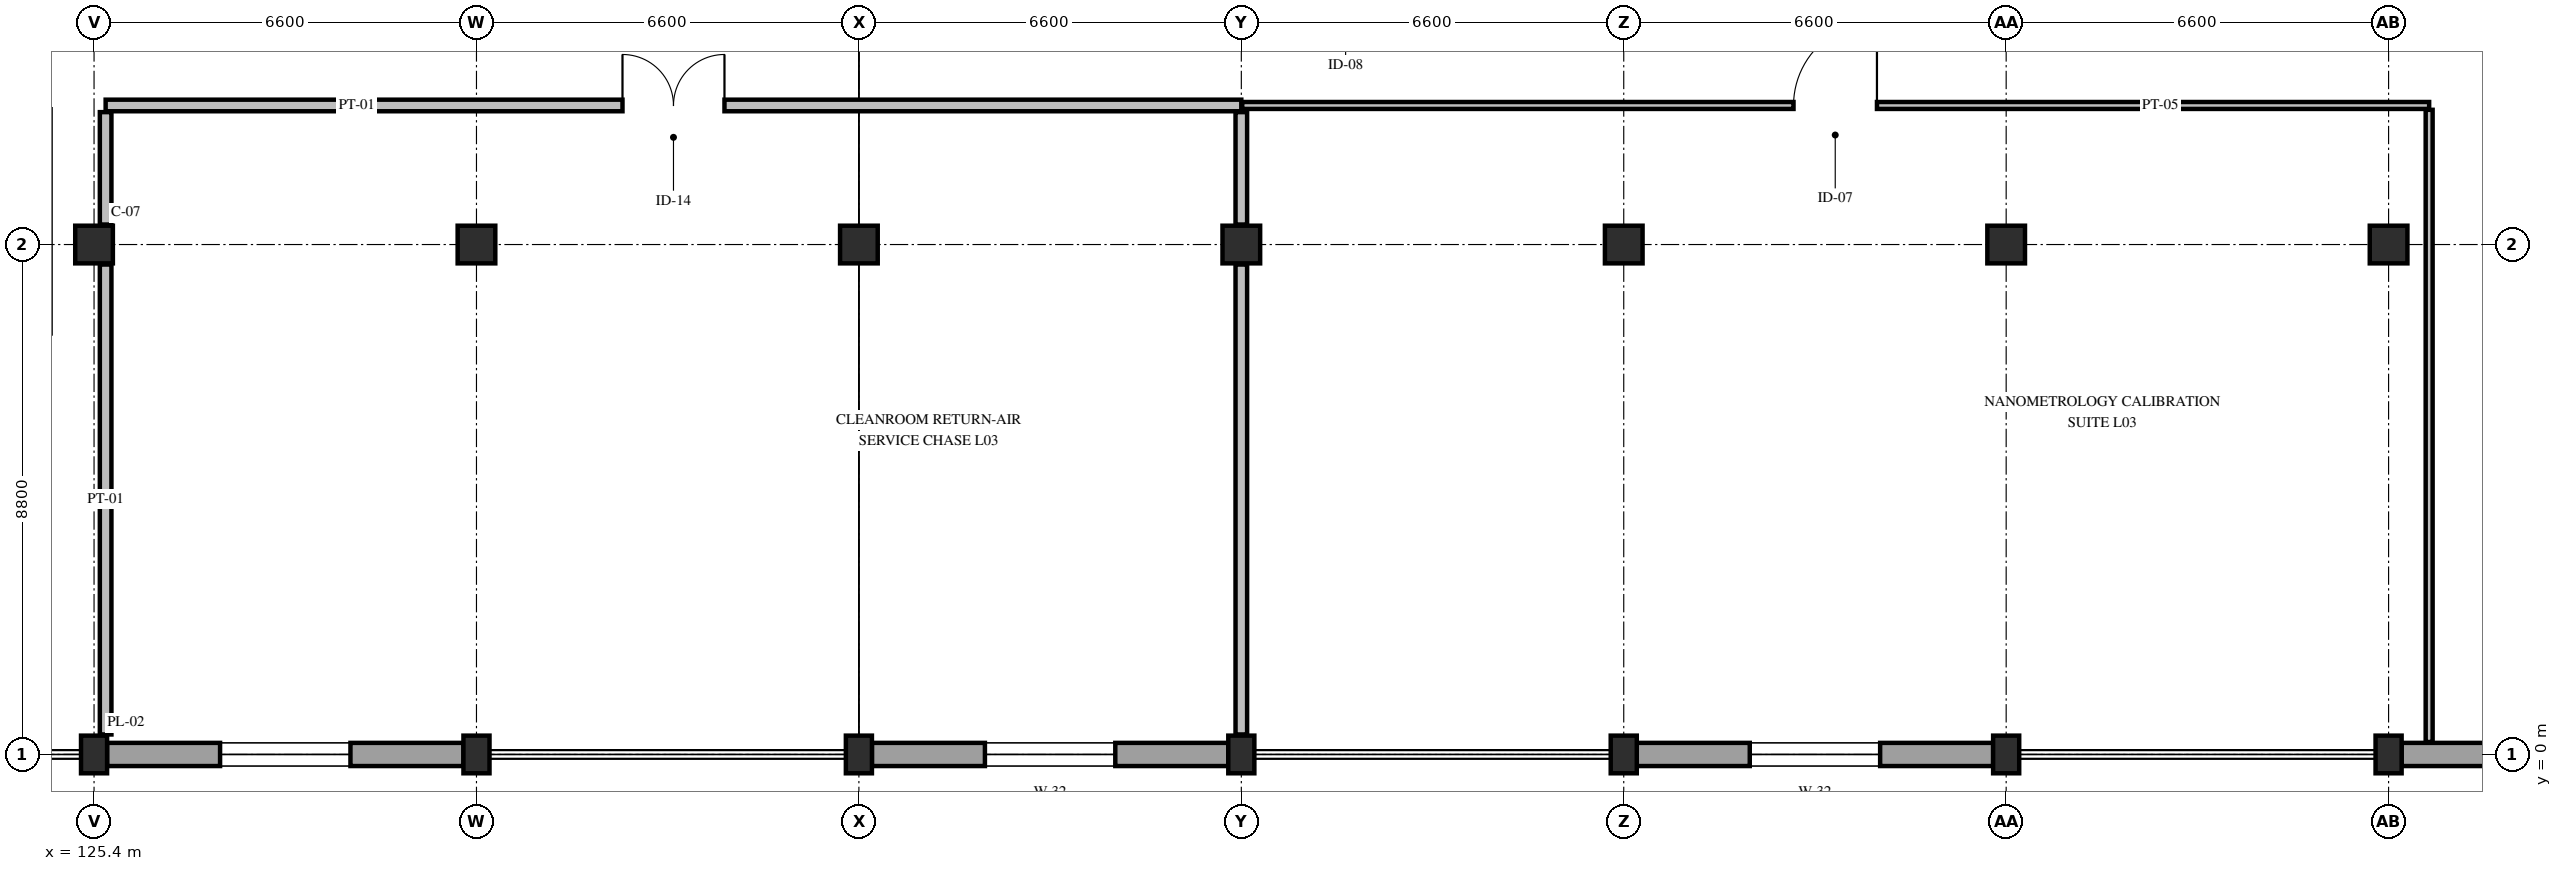
"""IFC4 building model, lengths in metres.
Left out: names, types, materials, properties, quantities, classifications, styles, units other than length and angle.
Written with IfcOpenShell. Run it as: python <this file> out.ifc"""

import sys

from ifc_helpers import new_model, si_unit, direction, frame, frame_2d, origin, origin_2d, place, context, subcontext, project, spatial, rectangle, extrude, element, fill, save


model = new_model("IFC4")
c1 = context("Model", 3, precision=1e-05, world=origin(), true_north=direction((0.0, 1.0)))
c2 = subcontext(c1, "Body", "Model", "MODEL_VIEW")
j1 = project(units=[si_unit("LENGTHUNIT", "METRE"), si_unit("PLANEANGLEUNIT", "RADIAN")], contexts=[c1])
p1 = place(None, origin())
s1 = spatial("IfcSite", under=j1, at=p1, CompositionType="ELEMENT")
p2 = place(p1, origin())
s2 = spatial("IfcBuilding", under=s1, at=p2, CompositionType="ELEMENT")
p3 = place(p2, frame((0.0, 0.0, 15.0)))
s3 = spatial("IfcBuildingStorey", under=s2, at=p3, CompositionType="ELEMENT", Elevation=15.0)
p4 = place(p3, frame((125.4, 0.0, 0.0), z_axis=(0.0, 0.0, 1.0), x_axis=(1.0, 0.0, 0.0)))
e1 = element("IfcColumn", 1, at=p4, inside=s3, PredefinedType="PILASTER", context=c2, shape_type="SweptSolid", body=[
    extrude(rectangle(XDim=0.45, YDim=0.65, at=origin_2d()), origin(), (0.0, 0.0, 1.0), 4.8),
])
p5 = place(p3, frame((125.4, 8.8, 0.0), z_axis=(0.0, 0.0, 1.0), x_axis=(1.0, 0.0, 0.0)))
e2 = element("IfcColumn", 2, at=p5, inside=s3, PredefinedType="COLUMN", context=c2, shape_type="SweptSolid", body=[
    extrude(rectangle(XDim=0.65, YDim=0.65, at=origin_2d()), origin(), (0.0, 0.0, 1.0), 4.8),
])
p6 = place(p3, frame((132.0, 0.0, 0.0), z_axis=(0.0, 0.0, 1.0), x_axis=(1.0, 0.0, 0.0)))
e3 = element("IfcColumn", 3, at=p6, inside=s3, PredefinedType="PILASTER", context=c2, shape_type="SweptSolid", body=[
    extrude(rectangle(XDim=0.45, YDim=0.65, at=origin_2d()), origin(), (0.0, 0.0, 1.0), 4.8),
])
p7 = place(p3, frame((132.0, 8.8, 0.0), z_axis=(0.0, 0.0, 1.0), x_axis=(1.0, 0.0, 0.0)))
e4 = element("IfcColumn", 4, at=p7, inside=s3, PredefinedType="COLUMN", context=c2, shape_type="SweptSolid", body=[
    extrude(rectangle(XDim=0.65, YDim=0.65, at=origin_2d()), origin(), (0.0, 0.0, 1.0), 4.8),
])
p8 = place(p3, frame((138.6, 0.0, 0.0), z_axis=(0.0, 0.0, 1.0), x_axis=(1.0, 0.0, 0.0)))
e5 = element("IfcColumn", 5, at=p8, inside=s3, PredefinedType="PILASTER", context=c2, shape_type="SweptSolid", body=[
    extrude(rectangle(XDim=0.45, YDim=0.65, at=origin_2d()), origin(), (0.0, 0.0, 1.0), 4.8),
])
p9 = place(p3, frame((138.6, 8.8, 0.0), z_axis=(0.0, 0.0, 1.0), x_axis=(1.0, 0.0, 0.0)))
e6 = element("IfcColumn", 6, at=p9, inside=s3, PredefinedType="COLUMN", context=c2, shape_type="SweptSolid", body=[
    extrude(rectangle(XDim=0.65, YDim=0.65, at=origin_2d()), origin(), (0.0, 0.0, 1.0), 4.8),
])
p10 = place(p3, frame((145.2, 0.0, 0.0), z_axis=(0.0, 0.0, 1.0), x_axis=(1.0, 0.0, 0.0)))
e7 = element("IfcColumn", 7, at=p10, inside=s3, PredefinedType="PILASTER", context=c2, shape_type="SweptSolid", body=[
    extrude(rectangle(XDim=0.45, YDim=0.65, at=origin_2d()), origin(), (0.0, 0.0, 1.0), 4.8),
])
p11 = place(p3, frame((145.2, 8.8, 0.0), z_axis=(0.0, 0.0, 1.0), x_axis=(1.0, 0.0, 0.0)))
e8 = element("IfcColumn", 8, at=p11, inside=s3, PredefinedType="COLUMN", context=c2, shape_type="SweptSolid", body=[
    extrude(rectangle(XDim=0.65, YDim=0.65, at=origin_2d()), origin(), (0.0, 0.0, 1.0), 4.8),
])
p12 = place(p3, frame((151.8, 0.0, 0.0), z_axis=(0.0, 0.0, 1.0), x_axis=(1.0, 0.0, 0.0)))
e9 = element("IfcColumn", 9, at=p12, inside=s3, PredefinedType="PILASTER", context=c2, shape_type="SweptSolid", body=[
    extrude(rectangle(XDim=0.45, YDim=0.65, at=origin_2d()), origin(), (0.0, 0.0, 1.0), 4.8),
])
p13 = place(p3, frame((151.8, 8.8, 0.0), z_axis=(0.0, 0.0, 1.0), x_axis=(1.0, 0.0, 0.0)))
e10 = element("IfcColumn", 10, at=p13, inside=s3, PredefinedType="COLUMN", context=c2, shape_type="SweptSolid", body=[
    extrude(rectangle(XDim=0.65, YDim=0.65, at=origin_2d()), origin(), (0.0, 0.0, 1.0), 4.8),
])
p14 = place(p3, frame((158.4, 0.0, 0.0), z_axis=(0.0, 0.0, 1.0), x_axis=(1.0, 0.0, 0.0)))
e11 = element("IfcColumn", 11, at=p14, inside=s3, PredefinedType="PILASTER", context=c2, shape_type="SweptSolid", body=[
    extrude(rectangle(XDim=0.45, YDim=0.65, at=origin_2d()), origin(), (0.0, 0.0, 1.0), 4.8),
])
p15 = place(p3, frame((158.4, 8.8, 0.0), z_axis=(0.0, 0.0, 1.0), x_axis=(1.0, 0.0, 0.0)))
e12 = element("IfcColumn", 12, at=p15, inside=s3, PredefinedType="COLUMN", context=c2, shape_type="SweptSolid", body=[
    extrude(rectangle(XDim=0.65, YDim=0.65, at=origin_2d()), origin(), (0.0, 0.0, 1.0), 4.8),
])
p16 = place(p3, frame((165.0, 0.0, 0.0), z_axis=(0.0, 0.0, 1.0), x_axis=(1.0, 0.0, 0.0)))
e13 = element("IfcColumn", 13, at=p16, inside=s3, PredefinedType="PILASTER", context=c2, shape_type="SweptSolid", body=[
    extrude(rectangle(XDim=0.45, YDim=0.65, at=origin_2d()), origin(), (0.0, 0.0, 1.0), 4.8),
])
p17 = place(p3, frame((165.0, 8.8, 0.0), z_axis=(0.0, 0.0, 1.0), x_axis=(1.0, 0.0, 0.0)))
e14 = element("IfcColumn", 14, at=p17, inside=s3, PredefinedType="COLUMN", context=c2, shape_type="SweptSolid", body=[
    extrude(rectangle(XDim=0.65, YDim=0.65, at=origin_2d()), origin(), (0.0, 0.0, 1.0), 4.8),
])
p18 = place(p3, frame((171.375, 0.0, 0.0), z_axis=(0.0, 0.0, 1.0), x_axis=(-1.0, 0.0, 0.0)))
e15 = element("IfcWall", 15, at=p18, inside=s3, PredefinedType="STANDARD", context=c2, shape_type="SweptSolid", body=[
    extrude(rectangle(XDim=6.15, YDim=0.4, at=frame_2d((3.075, 0.0))), origin(), (0.0, 0.0, 1.0), 3.98),
])
p19 = place(p18, frame((1.95, 0.0, 0.85)))
e16 = element("IfcOpeningElement", 16, at=p19, cuts=e15, PredefinedType="OPENING", context=c2, shape_type="SweptSolid", body=[
    extrude(rectangle(XDim=2.25, YDim=1.88, at=frame_2d((1.125, 0.94))), frame((0.0, 0.215, 0.0), z_axis=(0.0, -1.0, 0.0), x_axis=(1.0, 0.0, 0.0)), (0.0, 0.0, 1.0), 0.43),
])
p20 = place(p3, frame((158.175, 0.0, 0.0), z_axis=(0.0, 0.0, 1.0), x_axis=(-1.0, 0.0, 0.0)))
e17 = element("IfcWall", 17, at=p20, inside=s3, PredefinedType="STANDARD", context=c2, shape_type="SweptSolid", body=[
    extrude(rectangle(XDim=6.15, YDim=0.4, at=frame_2d((3.075, 0.0))), origin(), (0.0, 0.0, 1.0), 3.98),
])
p21 = place(p20, frame((1.95, 0.0, 0.85)))
e18 = element("IfcOpeningElement", 18, at=p21, cuts=e17, PredefinedType="OPENING", context=c2, shape_type="SweptSolid", body=[
    extrude(rectangle(XDim=2.25, YDim=1.88, at=frame_2d((1.125, 0.94))), frame((0.0, 0.215, 0.0), z_axis=(0.0, -1.0, 0.0), x_axis=(1.0, 0.0, 0.0)), (0.0, 0.0, 1.0), 0.43),
])
p22 = place(p3, frame((144.975, 0.0, 0.0), z_axis=(0.0, 0.0, 1.0), x_axis=(-1.0, 0.0, 0.0)))
e19 = element("IfcWall", 19, at=p22, inside=s3, PredefinedType="STANDARD", context=c2, shape_type="SweptSolid", body=[
    extrude(rectangle(XDim=6.15, YDim=0.4, at=frame_2d((3.075, 0.0))), origin(), (0.0, 0.0, 1.0), 3.98),
])
p23 = place(p22, frame((1.95, 0.0, 0.85)))
e20 = element("IfcOpeningElement", 20, at=p23, cuts=e19, PredefinedType="OPENING", context=c2, shape_type="SweptSolid", body=[
    extrude(rectangle(XDim=2.25, YDim=1.88, at=frame_2d((1.125, 0.94))), frame((0.0, 0.215, 0.0), z_axis=(0.0, -1.0, 0.0), x_axis=(1.0, 0.0, 0.0)), (0.0, 0.0, 1.0), 0.43),
])
p24 = place(p3, frame((131.775, 0.0, 0.0), z_axis=(0.0, 0.0, 1.0), x_axis=(-1.0, 0.0, 0.0)))
e21 = element("IfcWall", 21, at=p24, inside=s3, PredefinedType="STANDARD", context=c2, shape_type="SweptSolid", body=[
    extrude(rectangle(XDim=6.15, YDim=0.4, at=frame_2d((3.075, 0.0))), origin(), (0.0, 0.0, 1.0), 3.98),
])
p25 = place(p24, frame((1.95, 0.0, 0.85)))
e22 = element("IfcOpeningElement", 22, at=p25, cuts=e21, PredefinedType="OPENING", context=c2, shape_type="SweptSolid", body=[
    extrude(rectangle(XDim=2.25, YDim=1.88, at=frame_2d((1.125, 0.94))), frame((0.0, 0.215, 0.0), z_axis=(0.0, -1.0, 0.0), x_axis=(1.0, 0.0, 0.0)), (0.0, 0.0, 1.0), 0.43),
])
p26 = place(p3, frame((125.6, 11.2, 0.0), z_axis=(0.0, 0.0, 1.0), x_axis=(1.0, 0.0, 0.0)))
e23 = element("IfcWall", 23, at=p26, inside=s3, PredefinedType="PARTITIONING", context=c2, shape_type="SweptSolid", body=[
    extrude(rectangle(XDim=19.6, YDim=0.2, at=frame_2d((9.8, 0.0))), origin(), (0.0, 0.0, 1.0), 4.065),
])
p27 = place(p26, frame((8.92, 0.0, 0.0)))
e24 = element("IfcOpeningElement", 24, at=p27, cuts=e23, PredefinedType="OPENING", context=c2, shape_type="SweptSolid", body=[
    extrude(rectangle(XDim=1.76, YDim=2.35, at=frame_2d((0.88, 1.175))), frame((0.0, 0.115, 0.0), z_axis=(0.0, -1.0, 0.0), x_axis=(1.0, 0.0, 0.0)), (0.0, 0.0, 1.0), 0.23),
])
p28 = place(p3, frame((125.6, 0.345, 0.0), z_axis=(0.0, 0.0, 1.0), x_axis=(0.0, 1.0, 0.0)))
e25 = element("IfcWall", 25, at=p28, inside=s3, PredefinedType="PARTITIONING", context=c2, shape_type="SweptSolid", body=[
    extrude(rectangle(XDim=8.11, YDim=0.2, at=frame_2d((4.055, 0.0))), origin(), (0.0, 0.0, 1.0), 4.065),
])
p29 = place(p3, frame((125.6, 9.145, 0.0), z_axis=(0.0, 0.0, 1.0), x_axis=(0.0, 1.0, 0.0)))
e26 = element("IfcWall", 26, at=p29, inside=s3, PredefinedType="PARTITIONING", context=c2, shape_type="SweptSolid", body=[
    extrude(rectangle(XDim=1.94, YDim=0.2, at=frame_2d((0.97, 0.0))), origin(), (0.0, 0.0, 1.0), 4.065),
])
p30 = place(p3, frame((145.2, 0.345, 0.0), z_axis=(0.0, 0.0, 1.0), x_axis=(0.0, 1.0, 0.0)))
e27 = element("IfcWall", 27, at=p30, inside=s3, PredefinedType="PARTITIONING", context=c2, shape_type="SweptSolid", body=[
    extrude(rectangle(XDim=8.11, YDim=0.2, at=frame_2d((4.055, 0.0))), origin(), (0.0, 0.0, 1.0), 4.065),
])
p31 = place(p3, frame((145.2, 9.145, 0.0), z_axis=(0.0, 0.0, 1.0), x_axis=(0.0, 1.0, 0.0)))
e28 = element("IfcWall", 28, at=p31, inside=s3, PredefinedType="PARTITIONING", context=c2, shape_type="SweptSolid", body=[
    extrude(rectangle(XDim=1.94, YDim=0.2, at=frame_2d((0.97, 0.0))), origin(), (0.0, 0.0, 1.0), 4.065),
])
p32 = place(p3, frame((145.215, 11.2, 0.0), z_axis=(0.0, 0.0, 1.0), x_axis=(1.0, 0.0, 0.0)))
e29 = element("IfcWall", 29, at=p32, inside=s3, PredefinedType="PARTITIONING", context=c2, shape_type="SweptSolid", body=[
    extrude(rectangle(XDim=20.485, YDim=0.12, at=frame_2d((10.242, 0.0))), origin(), (0.0, 0.0, 1.0), 4.065),
])
p33 = place(p32, frame((9.515, 0.0, 0.0)))
e30 = element("IfcOpeningElement", 30, at=p33, cuts=e29, PredefinedType="OPENING", context=c2, shape_type="SweptSolid", body=[
    extrude(rectangle(XDim=1.44, YDim=2.25, at=frame_2d((0.72, 1.125))), frame((0.0, 0.075, 0.0), z_axis=(0.0, -1.0, 0.0), x_axis=(1.0, 0.0, 0.0)), (0.0, 0.0, 1.0), 0.15),
])
p34 = place(p3, frame((165.7, 0.215, 0.0), z_axis=(0.0, 0.0, 1.0), x_axis=(0.0, 1.0, 0.0)))
e31 = element("IfcWall", 31, at=p34, inside=s3, PredefinedType="PARTITIONING", context=c2, shape_type="SweptSolid", body=[
    extrude(rectangle(XDim=10.91, YDim=0.12, at=frame_2d((5.455, 0.0))), origin(), (0.0, 0.0, 1.0), 3.98),
])
p35 = place(p21, origin())
e32 = element("IfcWindow", 32, at=p35, inside=s3, PartitioningType="DOUBLE_PANEL_VERTICAL", PredefinedType="WINDOW", context=c2, shape_type="SweptSolid", body=[
    extrude(rectangle(XDim=2.25, YDim=1.88, at=frame_2d((1.125, 0.94))), frame((0.0, 0.03, 0.0), z_axis=(0.0, -1.0, 0.0), x_axis=(1.0, 0.0, 0.0)), (0.0, 0.0, 1.0), 0.06),
])
fill(e18, e32)
p36 = place(p23, origin())
e33 = element("IfcWindow", 33, at=p36, inside=s3, PartitioningType="DOUBLE_PANEL_VERTICAL", PredefinedType="WINDOW", context=c2, shape_type="SweptSolid", body=[
    extrude(rectangle(XDim=2.25, YDim=1.88, at=frame_2d((1.125, 0.94))), frame((0.0, 0.03, 0.0), z_axis=(0.0, -1.0, 0.0), x_axis=(1.0, 0.0, 0.0)), (0.0, 0.0, 1.0), 0.06),
])
fill(e20, e33)
p37 = place(p25, origin())
e34 = element("IfcWindow", 34, at=p37, inside=s3, PartitioningType="DOUBLE_PANEL_VERTICAL", PredefinedType="WINDOW", context=c2, shape_type="SweptSolid", body=[
    extrude(rectangle(XDim=2.25, YDim=1.88, at=frame_2d((1.125, 0.94))), frame((0.0, 0.03, 0.0), z_axis=(0.0, -1.0, 0.0), x_axis=(1.0, 0.0, 0.0)), (0.0, 0.0, 1.0), 0.06),
])
fill(e22, e34)
p38 = place(p27, origin())
e35 = element("IfcDoor", 35, at=p38, inside=s3, OperationType="DOUBLE_DOOR_SINGLE_SWING", PredefinedType="DOOR", context=c2, shape_type="SweptSolid", body=[
    extrude(rectangle(XDim=1.76, YDim=2.35, at=frame_2d((0.88, 1.175))), frame((0.0, 0.025, 0.0), z_axis=(0.0, -1.0, 0.0), x_axis=(1.0, 0.0, 0.0)), (0.0, 0.0, 1.0), 0.05),
])
fill(e24, e35)
p39 = place(p33, origin())
e36 = element("IfcDoor", 36, at=p39, inside=s3, OperationType="SINGLE_SWING_RIGHT", PredefinedType="DOOR", context=c2, shape_type="SweptSolid", body=[
    extrude(rectangle(XDim=1.44, YDim=2.25, at=frame_2d((0.72, 1.125))), frame((0.0, 0.025, 0.0), z_axis=(0.0, -1.0, 0.0), x_axis=(1.0, 0.0, 0.0)), (0.0, 0.0, 1.0), 0.05),
])
fill(e30, e36)
save(model, sys.argv[1])
